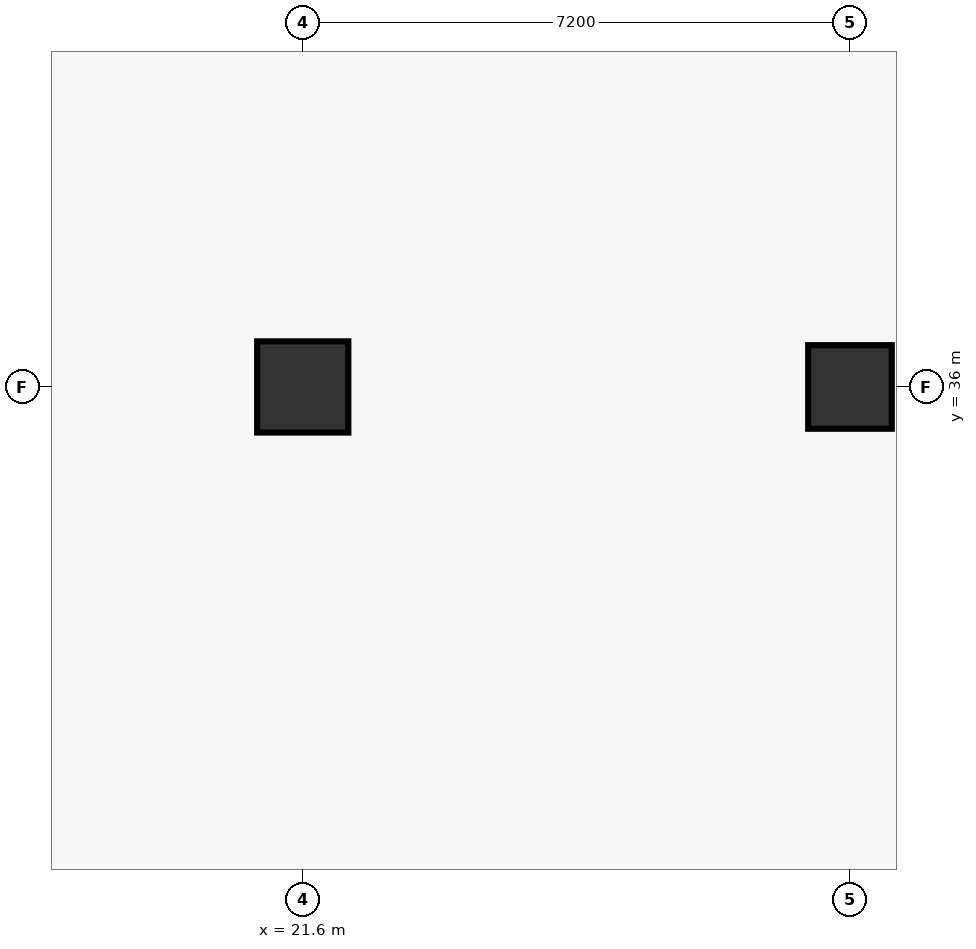
"""IFC4 building model, lengths in metres.
Left out: names, types, materials, properties, quantities, classifications, styles, units other than length and angle.
Written with IfcOpenShell. Run it as: python <this file> out.ifc"""

import sys

from ifc_helpers import new_model, si_unit, direction, frame, origin, origin_2d, place, context, subcontext, project, spatial, rectangle, circle, extrude, element, save


model = new_model("IFC4")
c1 = context("Model", 3, precision=1e-05, world=origin(), true_north=direction((0.0, 1.0)))
c2 = subcontext(c1, "Body", "Model", "MODEL_VIEW")
j1 = project(units=[si_unit("LENGTHUNIT", "METRE"), si_unit("PLANEANGLEUNIT", "RADIAN")], contexts=[c1])
p1 = place(None, origin())
s1 = spatial("IfcSite", under=j1, at=p1, CompositionType="ELEMENT")
p2 = place(p1, origin())
s2 = spatial("IfcBuilding", under=s1, at=p2, CompositionType="ELEMENT")
p3 = place(p2, frame((0.0, 0.0, -5.4)))
s3 = spatial("IfcBuildingStorey", under=s2, at=p3, CompositionType="ELEMENT", Elevation=-5.4)
p4 = place(p3, frame((21.6, 36.0, 0.0), z_axis=(0.0, 0.0, 1.0), x_axis=(1.0, 0.0, 0.0)))
e1 = element("IfcColumn", 1, at=p4, inside=s3, PredefinedType="COLUMN", context=c2, shape_type="SweptSolid", body=[
    extrude(circle(Radius=0.6, at=origin_2d()), origin(), (0.0, 0.0, 1.0), 5.4),
])
p5 = place(p3, frame((28.8, 36.0, 0.0), z_axis=(0.0, 0.0, 1.0), x_axis=(1.0, 0.0, 0.0)))
e2 = element("IfcColumn", 2, at=p5, inside=s3, PredefinedType="COLUMN", context=c2, shape_type="SweptSolid", body=[
    extrude(rectangle(XDim=1.1, YDim=1.1, at=origin_2d()), origin(), (0.0, 0.0, 1.0), 5.4),
])
save(model, sys.argv[1])
